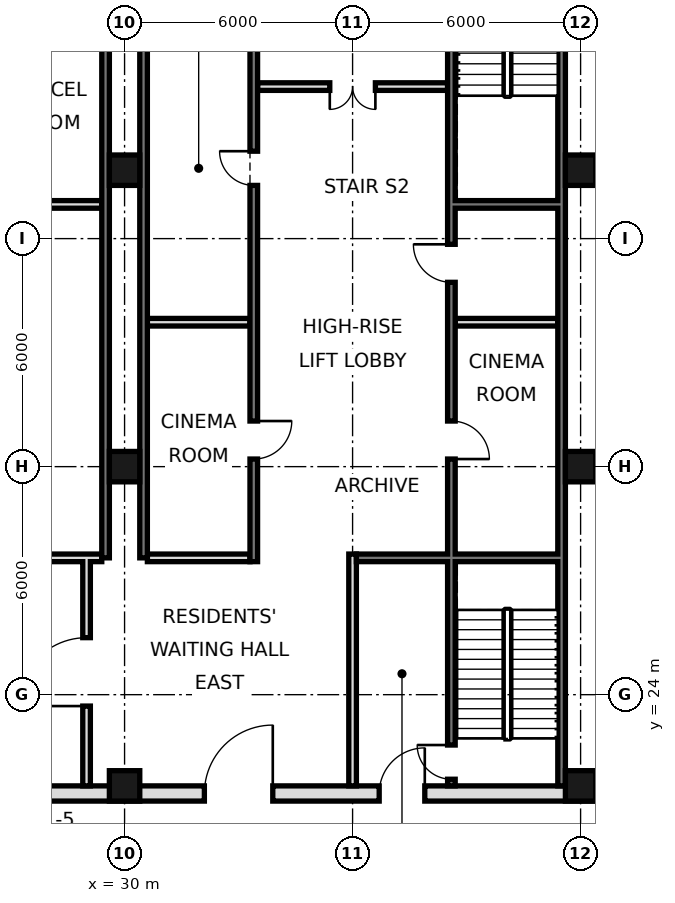
"""IFC4 building model, lengths in metres.
Left out: names, types, materials, properties, quantities, classifications, styles, units other than length and angle.
Written with IfcOpenShell. Run it as: python <this file> out.ifc"""

import sys

from ifc_helpers import new_model, si_unit, direction, frame, frame_2d, origin, origin_2d, place, context, subcontext, project, spatial, rectangle, hollow_rectangle, extrude, element, fill, save


model = new_model("IFC4")
c1 = context("Model", 3, precision=1e-05, world=origin(), true_north=direction((0.0, 1.0)))
c2 = subcontext(c1, "Body", "Model", "MODEL_VIEW")
j1 = project(units=[si_unit("LENGTHUNIT", "METRE"), si_unit("PLANEANGLEUNIT", "RADIAN")], contexts=[c1])
p1 = place(None, origin())
s1 = spatial("IfcSite", under=j1, at=p1, CompositionType="ELEMENT")
p2 = place(p1, origin())
s2 = spatial("IfcBuilding", under=s1, at=p2, CompositionType="ELEMENT")
p3 = place(p2, frame((0.0, 0.0, 20.4)))
s3 = spatial("IfcBuildingStorey", under=s2, at=p3, CompositionType="ELEMENT", Elevation=20.4)
for number, where, z_axis, x_axis in (
    (1, (30.0, 21.6, 0.0), (0.0, 0.0, 1.0), (1.0, 0.0, 0.0)),
    (2, (30.0, 30.0, 0.0), (0.0, 0.0, 1.0), (1.0, 0.0, 0.0)),
    (3, (30.0, 37.8, 0.0), (0.0, 0.0, 1.0), (1.0, 0.0, 0.0)),
    (4, (42.0, 21.6, 0.0), (0.0, 0.0, 1.0), (1.0, 0.0, 0.0)),
    (5, (42.0, 30.0, 0.0), (0.0, 0.0, 1.0), (1.0, 0.0, 0.0)),
    (6, (42.0, 37.8, 0.0), (0.0, 0.0, 1.0), (1.0, 0.0, 0.0)),
):
    element("IfcColumn", number, at=place(p3, frame(where, z_axis=z_axis, x_axis=x_axis)), inside=s3, PredefinedType="COLUMN", context=c2, shape_type="SweptSolid", body=[
        extrude(hollow_rectangle(XDim=0.8, YDim=0.8, WallThickness=0.07, at=origin_2d()), origin(), (0.0, 0.0, 1.0), 4.8),
    ])
p4 = place(p3, frame((41.5, 21.6, 0.0), z_axis=(0.0, 0.0, 1.0), x_axis=(0.0, 1.0, 0.0)))
e7 = element("IfcWall", 7, at=p4, inside=s3, PredefinedType="SOLIDWALL", context=c2, shape_type="SweptSolid", body=[
    extrude(rectangle(XDim=23.5, YDim=0.2, at=frame_2d((11.75, 0.0))), origin(), (0.0, 0.0, 1.0), 4.4),
])
for number, where, z_axis, x_axis in (
    (8, (29.5, 27.6, 0.0), (0.0, 0.0, 1.0), (0.0, 1.0, 0.0)),
    (9, (30.5, 27.6, 0.0), (0.0, 0.0, 1.0), (0.0, 1.0, 0.0)),
):
    element("IfcWall", number, at=place(p3, frame(where, z_axis=z_axis, x_axis=x_axis)), inside=s3, PredefinedType="SOLIDWALL", context=c2, shape_type="SweptSolid", body=[
        extrude(rectangle(XDim=17.5, YDim=0.2, at=frame_2d((8.75, 0.0))), origin(), (0.0, 0.0, 1.0), 4.4),
    ])
p5 = place(p3, frame((5.6, 21.4, 0.0), z_axis=(0.0, 0.0, 1.0), x_axis=(1.0, 0.0, 0.0)))
e10 = element("IfcWall", 10, at=p5, inside=s3, PredefinedType="SOLIDWALL", context=c2, shape_type="SweptSolid", body=[
    extrude(rectangle(XDim=36.8, YDim=0.4, at=frame_2d((18.4, 0.0))), origin(), (0.0, 0.0, 1.0), 4.4),
])
p6 = place(p5, frame((8.5, 0.0, 0.0)))
e11 = element("IfcOpeningElement", 11, at=p6, cuts=e10, PredefinedType="OPENING", context=c2, shape_type="SweptSolid", body=[
    extrude(rectangle(XDim=1.8, YDim=2.1, at=frame_2d((0.9, 1.05))), frame((0.0, 0.21, 0.0), z_axis=(0.0, -1.0, 0.0), x_axis=(1.0, 0.0, 0.0)), (0.0, 0.0, 1.0), 0.42),
])
p7 = place(p5, frame((17.5, 0.0, 0.0)))
e12 = element("IfcOpeningElement", 12, at=p7, cuts=e10, PredefinedType="OPENING", context=c2, shape_type="SweptSolid", body=[
    extrude(rectangle(XDim=1.8, YDim=2.1, at=frame_2d((0.9, 1.05))), frame((0.0, 0.21, 0.0), z_axis=(0.0, -1.0, 0.0), x_axis=(1.0, 0.0, 0.0)), (0.0, 0.0, 1.0), 0.42),
])
p8 = place(p5, frame((26.5, 0.0, 0.0)))
e13 = element("IfcOpeningElement", 13, at=p8, cuts=e10, PredefinedType="OPENING", context=c2, shape_type="SweptSolid", body=[
    extrude(rectangle(XDim=1.8, YDim=2.1, at=frame_2d((0.9, 1.05))), frame((0.0, 0.21, 0.0), z_axis=(0.0, -1.0, 0.0), x_axis=(1.0, 0.0, 0.0)), (0.0, 0.0, 1.0), 0.42),
])
p9 = place(p5, frame((4.5, 0.0, 0.0)))
e14 = element("IfcOpeningElement", 14, at=p9, cuts=e10, PredefinedType="OPENING", context=c2, shape_type="SweptSolid", body=[
    extrude(rectangle(XDim=1.2, YDim=2.1, at=frame_2d((0.6, 1.05))), frame((0.0, 0.21, 0.0), z_axis=(0.0, -1.0, 0.0), x_axis=(1.0, 0.0, 0.0)), (0.0, 0.0, 1.0), 0.42),
])
p10 = place(p5, frame((31.1, 0.0, 0.0)))
e15 = element("IfcOpeningElement", 15, at=p10, cuts=e10, PredefinedType="OPENING", context=c2, shape_type="SweptSolid", body=[
    extrude(rectangle(XDim=1.2, YDim=2.1, at=frame_2d((0.6, 1.05))), frame((0.0, 0.21, 0.0), z_axis=(0.0, -1.0, 0.0), x_axis=(1.0, 0.0, 0.0)), (0.0, 0.0, 1.0), 0.42),
])
p11 = place(p3, frame((29.0, 21.6, 0.0), z_axis=(0.0, 0.0, 1.0), x_axis=(0.0, 1.0, 0.0)))
e16 = element("IfcWall", 16, at=p11, inside=s3, PredefinedType="PARTITIONING", context=c2, shape_type="SweptSolid", body=[
    extrude(rectangle(XDim=6.0, YDim=0.2, at=frame_2d((3.0, 0.0))), origin(), (0.0, 0.0, 1.0), 4.4),
])
p12 = place(p11, frame((2.1, 0.0, 0.0)))
e17 = element("IfcOpeningElement", 17, at=p12, cuts=e16, PredefinedType="OPENING", context=c2, shape_type="SweptSolid", body=[
    extrude(rectangle(XDim=1.8, YDim=2.1, at=frame_2d((0.9, 1.05))), frame((0.0, 0.11, 0.0), z_axis=(0.0, -1.0, 0.0), x_axis=(1.0, 0.0, 0.0)), (0.0, 0.0, 1.0), 0.22),
])
p13 = place(p3, frame((33.4, 27.5, 0.0), z_axis=(0.0, 0.0, 1.0), x_axis=(0.0, 1.0, 0.0)))
e18 = element("IfcWall", 18, at=p13, inside=s3, PredefinedType="SOLIDWALL", context=c2, shape_type="SweptSolid", body=[
    extrude(rectangle(XDim=17.5, YDim=0.2, at=frame_2d((8.75, 0.0))), origin(), (0.0, 0.0, 1.0), 4.4),
])
p14 = place(p13, frame((15.4, 0.0, 0.0)))
e19 = element("IfcOpeningElement", 19, at=p14, cuts=e18, PredefinedType="OPENING", context=c2, shape_type="SweptSolid", body=[
    extrude(rectangle(XDim=1.1, YDim=2.1, at=frame_2d((0.55, 1.05))), frame((0.0, 0.11, 0.0), z_axis=(0.0, -1.0, 0.0), x_axis=(1.0, 0.0, 0.0)), (0.0, 0.0, 1.0), 0.22),
])
p15 = place(p13, frame((2.7, 0.0, 0.0)))
e20 = element("IfcOpeningElement", 20, at=p15, cuts=e18, PredefinedType="OPENING", context=c2, shape_type="SweptSolid", body=[
    extrude(rectangle(XDim=1.0, YDim=2.1, at=frame_2d((0.5, 1.05))), frame((0.0, 0.11, 0.0), z_axis=(0.0, -1.0, 0.0), x_axis=(1.0, 0.0, 0.0)), (0.0, 0.0, 1.0), 0.22),
])
p16 = place(p13, frame((9.9, 0.0, 0.0)))
e21 = element("IfcOpeningElement", 21, at=p16, cuts=e18, PredefinedType="OPENING", context=c2, shape_type="SweptSolid", body=[
    extrude(rectangle(XDim=0.9, YDim=2.1, at=frame_2d((0.45, 1.05))), frame((0.0, 0.11, 0.0), z_axis=(0.0, -1.0, 0.0), x_axis=(1.0, 0.0, 0.0)), (0.0, 0.0, 1.0), 0.22),
])
p17 = place(p3, frame((36.0, 21.6, 0.0), z_axis=(0.0, 0.0, 1.0), x_axis=(0.0, 1.0, 0.0)))
e22 = element("IfcWall", 22, at=p17, inside=s3, PredefinedType="PARTITIONING", context=c2, shape_type="SweptSolid", body=[
    extrude(rectangle(XDim=6.1, YDim=0.2, at=frame_2d((3.05, 0.0))), origin(), (0.0, 0.0, 1.0), 4.4),
])
p18 = place(p3, frame((38.6, 21.6, 0.0), z_axis=(0.0, 0.0, 1.0), x_axis=(0.0, 1.0, 0.0)))
e23 = element("IfcWall", 23, at=p18, inside=s3, PredefinedType="SOLIDWALL", context=c2, shape_type="SweptSolid", body=[
    extrude(rectangle(XDim=23.4, YDim=0.2, at=frame_2d((11.7, 0.0))), origin(), (0.0, 0.0, 1.0), 4.4),
])
p19 = place(p18, frame((8.6, 0.0, 0.0)))
e24 = element("IfcOpeningElement", 24, at=p19, cuts=e23, PredefinedType="OPENING", context=c2, shape_type="SweptSolid", body=[
    extrude(rectangle(XDim=1.0, YDim=2.1, at=frame_2d((0.5, 1.05))), frame((0.0, 0.11, 0.0), z_axis=(0.0, -1.0, 0.0), x_axis=(1.0, 0.0, 0.0)), (0.0, 0.0, 1.0), 0.22),
])
p20 = place(p18, frame((13.25, 0.0, 0.0)))
e25 = element("IfcOpeningElement", 25, at=p20, cuts=e23, PredefinedType="OPENING", context=c2, shape_type="SweptSolid", body=[
    extrude(rectangle(XDim=1.0, YDim=2.1, at=frame_2d((0.5, 1.05))), frame((0.0, 0.11, 0.0), z_axis=(0.0, -1.0, 0.0), x_axis=(1.0, 0.0, 0.0)), (0.0, 0.0, 1.0), 0.22),
])
p21 = place(p18, frame((22.1, 0.0, 0.0)))
e26 = element("IfcOpeningElement", 26, at=p21, cuts=e23, PredefinedType="OPENING", context=c2, shape_type="SweptSolid", body=[
    extrude(rectangle(XDim=1.0, YDim=2.1, at=frame_2d((0.5, 1.05))), frame((0.0, 0.11, 0.0), z_axis=(0.0, -1.0, 0.0), x_axis=(1.0, 0.0, 0.0)), (0.0, 0.0, 1.0), 0.22),
])
p22 = place(p18, frame((0.175, 0.0, 0.0)))
e27 = element("IfcOpeningElement", 27, at=p22, cuts=e23, PredefinedType="OPENING", context=c2, shape_type="SweptSolid", body=[
    extrude(rectangle(XDim=0.9, YDim=2.1, at=frame_2d((0.45, 1.05))), frame((0.0, 0.11, 0.0), z_axis=(0.0, -1.0, 0.0), x_axis=(1.0, 0.0, 0.0)), (0.0, 0.0, 1.0), 0.22),
])
p23 = place(p3, frame((26.7, 27.6, 0.0), z_axis=(0.0, 0.0, 1.0), x_axis=(1.0, 0.0, 0.0)))
e28 = element("IfcWall", 28, at=p23, inside=s3, PredefinedType="SOLIDWALL", context=c2, shape_type="SweptSolid", body=[
    extrude(rectangle(XDim=2.7, YDim=0.2, at=frame_2d((1.35, 0.0))), origin(), (0.0, 0.0, 1.0), 4.4),
])
p24 = place(p3, frame((30.6, 27.6, 0.0), z_axis=(0.0, 0.0, 1.0), x_axis=(1.0, 0.0, 0.0)))
e29 = element("IfcWall", 29, at=p24, inside=s3, PredefinedType="PARTITIONING", context=c2, shape_type="SweptSolid", body=[
    extrude(rectangle(XDim=2.7, YDim=0.2, at=frame_2d((1.35, 0.0))), origin(), (0.0, 0.0, 1.0), 4.4),
])
p25 = place(p3, frame((36.1, 27.6, 0.0), z_axis=(0.0, 0.0, 1.0), x_axis=(1.0, 0.0, 0.0)))
e30 = element("IfcWall", 30, at=p25, inside=s3, PredefinedType="SOLIDWALL", context=c2, shape_type="SweptSolid", body=[
    extrude(rectangle(XDim=5.3, YDim=0.2, at=frame_2d((2.65, 0.0))), origin(), (0.0, 0.0, 1.0), 4.4),
])
p26 = place(p3, frame((30.6, 33.8, 0.0), z_axis=(0.0, 0.0, 1.0), x_axis=(1.0, 0.0, 0.0)))
e31 = element("IfcWall", 31, at=p26, inside=s3, PredefinedType="SOLIDWALL", context=c2, shape_type="SweptSolid", body=[
    extrude(rectangle(XDim=2.7, YDim=0.2, at=frame_2d((1.35, 0.0))), origin(), (0.0, 0.0, 1.0), 4.4),
])
p27 = place(p3, frame((38.7, 33.8, 0.0), z_axis=(0.0, 0.0, 1.0), x_axis=(1.0, 0.0, 0.0)))
e32 = element("IfcWall", 32, at=p27, inside=s3, PredefinedType="PARTITIONING", context=c2, shape_type="SweptSolid", body=[
    extrude(rectangle(XDim=2.7, YDim=0.2, at=frame_2d((1.35, 0.0))), origin(), (0.0, 0.0, 1.0), 4.4),
])
for number, where, z_axis, x_axis in (
    (33, (26.7, 36.9, 0.0), (0.0, 0.0, 1.0), (1.0, 0.0, 0.0)),
    (34, (38.7, 36.9, 0.0), (0.0, 0.0, 1.0), (1.0, 0.0, 0.0)),
):
    element("IfcWall", number, at=place(p3, frame(where, z_axis=z_axis, x_axis=x_axis)), inside=s3, PredefinedType="SOLIDWALL", context=c2, shape_type="SweptSolid", body=[
        extrude(rectangle(XDim=2.7, YDim=0.2, at=frame_2d((1.35, 0.0))), origin(), (0.0, 0.0, 1.0), 4.4),
    ])
p28 = place(p3, frame((33.5, 40.0, 0.0), z_axis=(0.0, 0.0, 1.0), x_axis=(1.0, 0.0, 0.0)))
e35 = element("IfcWall", 35, at=p28, inside=s3, PredefinedType="PARTITIONING", context=c2, shape_type="SweptSolid", body=[
    extrude(rectangle(XDim=5.0, YDim=0.2, at=frame_2d((2.5, 0.0))), origin(), (0.0, 0.0, 1.0), 4.4),
])
p29 = place(p28, frame((1.9, 0.0, 0.0)))
e36 = element("IfcOpeningElement", 36, at=p29, cuts=e35, PredefinedType="OPENING", context=c2, shape_type="SweptSolid", body=[
    extrude(rectangle(XDim=1.2, YDim=2.1, at=frame_2d((0.6, 1.05))), frame((0.0, 0.11, 0.0), z_axis=(0.0, -1.0, 0.0), x_axis=(1.0, 0.0, 0.0)), (0.0, 0.0, 1.0), 0.22),
])
p30 = place(p12, origin())
e37 = element("IfcDoor", 37, at=p30, inside=s3, OperationType="SINGLE_SWING_LEFT", PredefinedType="DOOR", context=c2, shape_type="SweptSolid", body=[
    extrude(rectangle(XDim=1.8, YDim=2.1, at=frame_2d((0.9, 1.05))), frame((0.0, 0.025, 0.0), z_axis=(0.0, -1.0, 0.0), x_axis=(1.0, 0.0, 0.0)), (0.0, 0.0, 1.0), 0.05),
])
fill(e17, e37)
p31 = place(p8, frame((1.8, 0.0, 0.0), z_axis=(0.0, 0.0, 1.0), x_axis=(-1.0, 0.0, 0.0)))
e38 = element("IfcDoor", 38, at=p31, inside=s3, OperationType="SINGLE_SWING_LEFT", PredefinedType="DOOR", context=c2, shape_type="SweptSolid", body=[
    extrude(rectangle(XDim=1.8, YDim=2.1, at=frame_2d((0.9, 1.05))), frame((0.0, 0.025, 0.0), z_axis=(0.0, -1.0, 0.0), x_axis=(1.0, 0.0, 0.0)), (0.0, 0.0, 1.0), 0.05),
])
fill(e13, e38)
p32 = place(p10, frame((1.2, 0.0, 0.0), z_axis=(0.0, 0.0, 1.0), x_axis=(-1.0, 0.0, 0.0)))
e39 = element("IfcDoor", 39, at=p32, inside=s3, OperationType="SINGLE_SWING_LEFT", PredefinedType="DOOR", context=c2, shape_type="SweptSolid", body=[
    extrude(rectangle(XDim=1.2, YDim=2.1, at=frame_2d((0.6, 1.05))), frame((0.0, 0.025, 0.0), z_axis=(0.0, -1.0, 0.0), x_axis=(1.0, 0.0, 0.0)), (0.0, 0.0, 1.0), 0.05),
])
fill(e15, e39)
p33 = place(p29, frame((1.2, 0.0, 0.0), z_axis=(0.0, 0.0, 1.0), x_axis=(-1.0, 0.0, 0.0)))
e40 = element("IfcDoor", 40, at=p33, inside=s3, OperationType="DOUBLE_DOOR_SINGLE_SWING", PredefinedType="DOOR", context=c2, shape_type="SweptSolid", body=[
    extrude(rectangle(XDim=1.2, YDim=2.1, at=frame_2d((0.6, 1.05))), frame((0.0, 0.025, 0.0), z_axis=(0.0, -1.0, 0.0), x_axis=(1.0, 0.0, 0.0)), (0.0, 0.0, 1.0), 0.05),
])
fill(e36, e40)
p34 = place(p19, frame((1.0, 0.0, 0.0), z_axis=(0.0, 0.0, 1.0), x_axis=(-1.0, 0.0, 0.0)))
e41 = element("IfcDoor", 41, at=p34, inside=s3, OperationType="SINGLE_SWING_RIGHT", PredefinedType="DOOR", context=c2, shape_type="SweptSolid", body=[
    extrude(rectangle(XDim=1.0, YDim=2.1, at=frame_2d((0.5, 1.05))), frame((0.0, 0.025, 0.0), z_axis=(0.0, -1.0, 0.0), x_axis=(1.0, 0.0, 0.0)), (0.0, 0.0, 1.0), 0.05),
])
fill(e24, e41)
p35 = place(p20, frame((1.0, 0.0, 0.0), z_axis=(0.0, 0.0, 1.0), x_axis=(-1.0, 0.0, 0.0)))
e42 = element("IfcDoor", 42, at=p35, inside=s3, OperationType="SINGLE_SWING_LEFT", PredefinedType="DOOR", context=c2, shape_type="SweptSolid", body=[
    extrude(rectangle(XDim=1.0, YDim=2.1, at=frame_2d((0.5, 1.05))), frame((0.0, 0.025, 0.0), z_axis=(0.0, -1.0, 0.0), x_axis=(1.0, 0.0, 0.0)), (0.0, 0.0, 1.0), 0.05),
])
fill(e25, e42)
p36 = place(p15, origin())
e43 = element("IfcDoor", 43, at=p36, inside=s3, OperationType="SINGLE_SWING_RIGHT", PredefinedType="DOOR", context=c2, shape_type="SweptSolid", body=[
    extrude(rectangle(XDim=1.0, YDim=2.1, at=frame_2d((0.5, 1.05))), frame((0.0, 0.025, 0.0), z_axis=(0.0, -1.0, 0.0), x_axis=(1.0, 0.0, 0.0)), (0.0, 0.0, 1.0), 0.05),
])
fill(e20, e43)
p37 = place(p22, frame((0.9, 0.0, 0.0), z_axis=(0.0, 0.0, 1.0), x_axis=(-1.0, 0.0, 0.0)))
e44 = element("IfcDoor", 44, at=p37, inside=s3, OperationType="SINGLE_SWING_LEFT", PredefinedType="DOOR", context=c2, shape_type="SweptSolid", body=[
    extrude(rectangle(XDim=0.9, YDim=2.1, at=frame_2d((0.45, 1.05))), frame((0.0, 0.025, 0.0), z_axis=(0.0, -1.0, 0.0), x_axis=(1.0, 0.0, 0.0)), (0.0, 0.0, 1.0), 0.05),
])
fill(e27, e44)
p38 = place(p16, frame((0.9, 0.0, 0.0), z_axis=(0.0, 0.0, 1.0), x_axis=(-1.0, 0.0, 0.0)))
e45 = element("IfcDoor", 45, at=p38, inside=s3, OperationType="SINGLE_SWING_LEFT", PredefinedType="DOOR", context=c2, shape_type="SweptSolid", body=[
    extrude(rectangle(XDim=0.9, YDim=2.1, at=frame_2d((0.45, 1.05))), frame((0.0, 0.025, 0.0), z_axis=(0.0, -1.0, 0.0), x_axis=(1.0, 0.0, 0.0)), (0.0, 0.0, 1.0), 0.05),
])
fill(e21, e45)
save(model, sys.argv[1])
